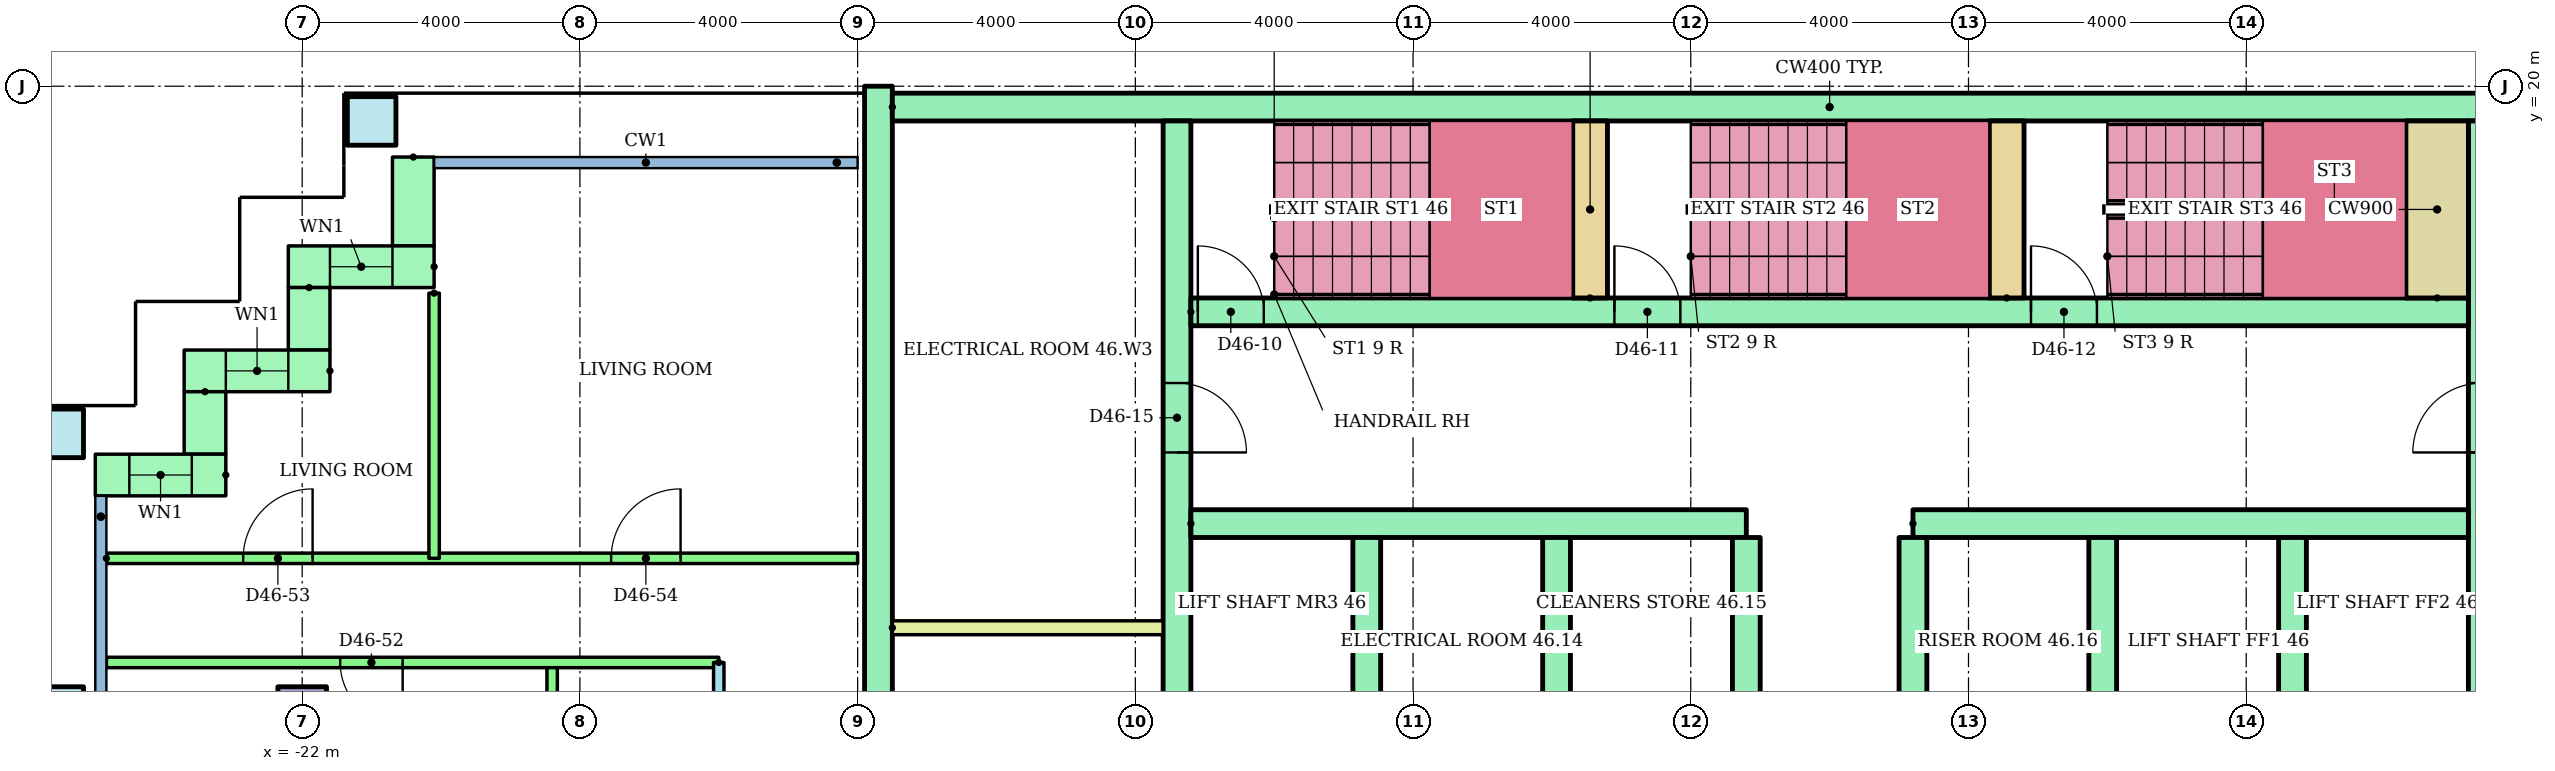
"""IFC4 building model, lengths in metres.
Left out: names, types, materials, properties, quantities, classifications, styles, units other than length and angle.
Written with IfcOpenShell. Run it as: python <this file> out.ifc"""

import sys

from ifc_helpers import new_model, si_unit, direction, frame, frame_2d, origin, origin_2d, place, context, subcontext, project, spatial, rectangle, hollow_rectangle, extrude, element, fill, save


model = new_model("IFC4")
c1 = context("Model", 3, precision=1e-05, world=origin(), true_north=direction((0.0, 1.0)))
c2 = subcontext(c1, "Body", "Model", "MODEL_VIEW")
j1 = project(units=[si_unit("LENGTHUNIT", "METRE"), si_unit("PLANEANGLEUNIT", "RADIAN")], contexts=[c1])
p1 = place(None, origin())
s1 = spatial("IfcSite", under=j1, at=p1, CompositionType="ELEMENT")
p2 = place(p1, origin())
s2 = spatial("IfcBuilding", under=s1, at=p2, CompositionType="ELEMENT")
p3 = place(p2, frame((0.0, 0.0, 178.1)))
s3 = spatial("IfcBuildingStorey", under=s2, at=p3, CompositionType="ELEMENT", Elevation=178.1)
p4 = place(p3, frame((-25.5, 11.0, 0.0)))
e1 = element("IfcColumn", 1, at=p4, inside=s3, PredefinedType="COLUMN", context=c2, shape_type="SweptSolid", body=[
    extrude(hollow_rectangle(XDim=0.7, YDim=0.7, WallThickness=0.036, at=origin_2d()), origin(), (0.0, 0.0, 1.0), 3.2),
])
p5 = place(p3, frame((-22.0, 11.0, 0.0)))
e2 = element("IfcColumn", 2, at=p5, inside=s3, PredefinedType="COLUMN", context=c2, shape_type="SweptSolid", body=[
    extrude(rectangle(XDim=0.7, YDim=0.7, at=origin_2d()), origin(), (0.0, 0.0, 1.0), 3.2),
])
for number, where in (
    (3, (-25.5, 15.0, 0.0)),
    (4, (-21.0, 19.5, 0.0)),
):
    element("IfcColumn", number, at=place(p3, frame(where)), inside=s3, PredefinedType="COLUMN", context=c2, shape_type="SweptSolid", body=[
        extrude(hollow_rectangle(XDim=0.7, YDim=0.7, WallThickness=0.036, at=origin_2d()), origin(), (0.0, 0.0, 1.0), 3.2),
    ])
p6 = place(p3, frame((-20.4, 18.98, 0.0), z_axis=(0.0, 0.0, 1.0), x_axis=(0.0, -1.0, 0.0)))
e5 = element("IfcWall", 5, at=p6, inside=s3, PredefinedType="STANDARD", context=c2, shape_type="SweptSolid", body=[
    extrude(rectangle(XDim=1.28, YDim=0.6, at=frame_2d((0.64, 0.0))), origin(), (0.0, 0.0, 1.0), 2.92),
])
p7 = place(p3, frame((-20.1, 17.4, 0.0), z_axis=(0.0, 0.0, 1.0), x_axis=(-1.0, 0.0, 0.0)))
e6 = element("IfcWall", 6, at=p7, inside=s3, PredefinedType="STANDARD", context=c2, shape_type="SweptSolid", body=[
    extrude(rectangle(XDim=2.1, YDim=0.6, at=frame_2d((1.05, 0.0))), origin(), (0.0, 0.0, 1.0), 2.92),
])
p8 = place(p7, frame((0.6, 0.0, 0.9)))
e7 = element("IfcOpeningElement", 7, at=p8, cuts=e6, PredefinedType="OPENING", context=c2, shape_type="SweptSolid", body=[
    extrude(rectangle(XDim=0.9, YDim=1.5, at=frame_2d((0.45, 0.75))), frame((0.0, 0.31, 0.0), z_axis=(0.0, -1.0, 0.0), x_axis=(1.0, 0.0, 0.0)), (0.0, 0.0, 1.0), 0.62),
])
p9 = place(p3, frame((-21.9, 17.1, 0.0), z_axis=(0.0, 0.0, 1.0), x_axis=(0.0, -1.0, 0.0)))
e8 = element("IfcWall", 8, at=p9, inside=s3, PredefinedType="STANDARD", context=c2, shape_type="SweptSolid", body=[
    extrude(rectangle(XDim=0.9, YDim=0.6, at=frame_2d((0.45, 0.0))), origin(), (0.0, 0.0, 1.0), 2.92),
])
p10 = place(p3, frame((-21.6, 15.9, 0.0), z_axis=(0.0, 0.0, 1.0), x_axis=(-1.0, 0.0, 0.0)))
e9 = element("IfcWall", 9, at=p10, inside=s3, PredefinedType="STANDARD", context=c2, shape_type="SweptSolid", body=[
    extrude(rectangle(XDim=2.1, YDim=0.6, at=frame_2d((1.05, 0.0))), origin(), (0.0, 0.0, 1.0), 2.92),
])
p11 = place(p10, frame((0.6, 0.0, 0.9)))
e10 = element("IfcOpeningElement", 10, at=p11, cuts=e9, PredefinedType="OPENING", context=c2, shape_type="SweptSolid", body=[
    extrude(rectangle(XDim=0.9, YDim=1.5, at=frame_2d((0.45, 0.75))), frame((0.0, 0.31, 0.0), z_axis=(0.0, -1.0, 0.0), x_axis=(1.0, 0.0, 0.0)), (0.0, 0.0, 1.0), 0.62),
])
p12 = place(p3, frame((-23.4, 15.6, 0.0), z_axis=(0.0, 0.0, 1.0), x_axis=(0.0, -1.0, 0.0)))
e11 = element("IfcWall", 11, at=p12, inside=s3, PredefinedType="STANDARD", context=c2, shape_type="SweptSolid", body=[
    extrude(rectangle(XDim=0.9, YDim=0.6, at=frame_2d((0.45, 0.0))), origin(), (0.0, 0.0, 1.0), 2.92),
])
p13 = place(p3, frame((-23.1, 14.4, 0.0), z_axis=(0.0, 0.0, 1.0), x_axis=(-1.0, 0.0, 0.0)))
e12 = element("IfcWall", 12, at=p13, inside=s3, PredefinedType="STANDARD", context=c2, shape_type="SweptSolid", body=[
    extrude(rectangle(XDim=1.88, YDim=0.6, at=frame_2d((0.94, 0.0))), origin(), (0.0, 0.0, 1.0), 2.92),
])
p14 = place(p13, frame((0.49, 0.0, 0.9)))
e13 = element("IfcOpeningElement", 13, at=p14, cuts=e12, PredefinedType="OPENING", context=c2, shape_type="SweptSolid", body=[
    extrude(rectangle(XDim=0.9, YDim=1.5, at=frame_2d((0.45, 0.75))), frame((0.0, 0.31, 0.0), z_axis=(0.0, -1.0, 0.0), x_axis=(1.0, 0.0, 0.0)), (0.0, 0.0, 1.0), 0.62),
])
p15 = place(p3, frame((-13.7, 3.0, 0.0), z_axis=(0.0, 0.0, 1.0), x_axis=(0.0, 1.0, 0.0)))
e14 = element("IfcWall", 14, at=p15, inside=s3, PredefinedType="SHEAR", context=c2, shape_type="SweptSolid", body=[
    extrude(rectangle(XDim=17.0, YDim=0.4, at=frame_2d((8.5, 0.0))), origin(), (0.0, 0.0, 1.0), 2.92),
])
p16 = place(p3, frame((-13.5, 19.7, 0.0)))
e15 = element("IfcWall", 15, at=p16, inside=s3, PredefinedType="SHEAR", context=c2, shape_type="SweptSolid", body=[
    extrude(rectangle(XDim=27.0, YDim=0.4, at=frame_2d((13.5, 0.0))), origin(), (0.0, 0.0, 1.0), 2.92),
])
p17 = place(p3, frame((-9.4, 6.8, 0.0), z_axis=(0.0, 0.0, 1.0), x_axis=(0.0, 1.0, 0.0)))
e16 = element("IfcWall", 16, at=p17, inside=s3, PredefinedType="SHEAR", context=c2, shape_type="SweptSolid", body=[
    extrude(rectangle(XDim=12.7, YDim=0.4, at=frame_2d((6.35, 0.0))), origin(), (0.0, 0.0, 1.0), 2.92),
])
p18 = place(p17, frame((0.3, 0.0, 0.0)))
e17 = element("IfcOpeningElement", 17, at=p18, cuts=e16, PredefinedType="OPENING", context=c2, shape_type="SweptSolid", body=[
    extrude(rectangle(XDim=1.0, YDim=2.1, at=frame_2d((0.5, 1.05))), frame((0.0, 0.21, 0.0), z_axis=(0.0, -1.0, 0.0), x_axis=(1.0, 0.0, 0.0)), (0.0, 0.0, 1.0), 0.42),
])
p19 = place(p17, frame((2.05, 0.0, 0.0)))
e18 = element("IfcOpeningElement", 18, at=p19, cuts=e16, PredefinedType="OPENING", context=c2, shape_type="SweptSolid", body=[
    extrude(rectangle(XDim=1.0, YDim=2.1, at=frame_2d((0.5, 1.05))), frame((0.0, 0.21, 0.0), z_axis=(0.0, -1.0, 0.0), x_axis=(1.0, 0.0, 0.0)), (0.0, 0.0, 1.0), 0.42),
])
p20 = place(p17, frame((7.925, 0.0, 0.0)))
e19 = element("IfcOpeningElement", 19, at=p20, cuts=e16, PredefinedType="OPENING", context=c2, shape_type="SweptSolid", body=[
    extrude(rectangle(XDim=1.0, YDim=2.1, at=frame_2d((0.5, 1.05))), frame((0.0, 0.21, 0.0), z_axis=(0.0, -1.0, 0.0), x_axis=(1.0, 0.0, 0.0)), (0.0, 0.0, 1.0), 0.42),
])
p21 = place(p3, frame((9.4, 6.8, 0.0), z_axis=(0.0, 0.0, 1.0), x_axis=(0.0, 1.0, 0.0)))
e20 = element("IfcWall", 20, at=p21, inside=s3, PredefinedType="SHEAR", context=c2, shape_type="SweptSolid", body=[
    extrude(rectangle(XDim=12.7, YDim=0.4, at=frame_2d((6.35, 0.0))), origin(), (0.0, 0.0, 1.0), 2.92),
])
p22 = place(p21, frame((1.15, 0.0, 0.0)))
e21 = element("IfcOpeningElement", 21, at=p22, cuts=e20, PredefinedType="OPENING", context=c2, shape_type="SweptSolid", body=[
    extrude(rectangle(XDim=1.0, YDim=2.1, at=frame_2d((0.5, 1.05))), frame((0.0, 0.21, 0.0), z_axis=(0.0, -1.0, 0.0), x_axis=(1.0, 0.0, 0.0)), (0.0, 0.0, 1.0), 0.42),
])
p23 = place(p21, frame((7.925, 0.0, 0.0)))
e22 = element("IfcOpeningElement", 22, at=p23, cuts=e20, PredefinedType="OPENING", context=c2, shape_type="SweptSolid", body=[
    extrude(rectangle(XDim=1.0, YDim=2.1, at=frame_2d((0.5, 1.05))), frame((0.0, 0.21, 0.0), z_axis=(0.0, -1.0, 0.0), x_axis=(1.0, 0.0, 0.0)), (0.0, 0.0, 1.0), 0.42),
])
for number, where in (
    (23, (-9.2, 13.7, 0.0)),
    (24, (1.2, 13.7, 0.0)),
):
    element("IfcWall", number, at=place(p3, frame(where)), inside=s3, PredefinedType="SHEAR", context=c2, shape_type="SweptSolid", body=[
        extrude(rectangle(XDim=8.0, YDim=0.4, at=frame_2d((4.0, 0.0))), origin(), (0.0, 0.0, 1.0), 2.92),
    ])
for number, where, z_axis, x_axis in (
    (25, (-6.667, 10.5, 0.0), (0.0, 0.0, 1.0), (0.0, 1.0, 0.0)),
    (26, (-3.933, 10.5, 0.0), (0.0, 0.0, 1.0), (0.0, 1.0, 0.0)),
    (27, (-1.2, 10.5, 0.0), (0.0, 0.0, 1.0), (0.0, 1.0, 0.0)),
    (28, (1.2, 10.5, 0.0), (0.0, 0.0, 1.0), (0.0, 1.0, 0.0)),
    (29, (3.933, 10.5, 0.0), (0.0, 0.0, 1.0), (0.0, 1.0, 0.0)),
    (30, (6.667, 10.5, 0.0), (0.0, 0.0, 1.0), (0.0, 1.0, 0.0)),
):
    element("IfcWall", number, at=place(p3, frame(where, z_axis=z_axis, x_axis=x_axis)), inside=s3, PredefinedType="SHEAR", context=c2, shape_type="SweptSolid", body=[
        extrude(rectangle(XDim=3.0, YDim=0.4, at=frame_2d((1.5, 0.0))), origin(), (0.0, 0.0, 1.0), 2.92),
    ])
p24 = place(p3, frame((-9.2, 16.75, 0.0)))
e31 = element("IfcWall", 31, at=p24, inside=s3, PredefinedType="SHEAR", context=c2, shape_type="SweptSolid", body=[
    extrude(rectangle(XDim=18.4, YDim=0.4, at=frame_2d((9.2, 0.0))), origin(), (0.0, 0.0, 1.0), 2.92),
])
p25 = place(p24, frame((0.1, 0.0, 0.0)))
e32 = element("IfcOpeningElement", 32, at=p25, cuts=e31, PredefinedType="OPENING", context=c2, shape_type="SweptSolid", body=[
    extrude(rectangle(XDim=0.95, YDim=2.1, at=frame_2d((0.475, 1.05))), frame((0.0, 0.21, 0.0), z_axis=(0.0, -1.0, 0.0), x_axis=(1.0, 0.0, 0.0)), (0.0, 0.0, 1.0), 0.42),
])
p26 = place(p24, frame((6.1, 0.0, 0.0)))
e33 = element("IfcOpeningElement", 33, at=p26, cuts=e31, PredefinedType="OPENING", context=c2, shape_type="SweptSolid", body=[
    extrude(rectangle(XDim=0.95, YDim=2.1, at=frame_2d((0.475, 1.05))), frame((0.0, 0.21, 0.0), z_axis=(0.0, -1.0, 0.0), x_axis=(1.0, 0.0, 0.0)), (0.0, 0.0, 1.0), 0.42),
])
p27 = place(p24, frame((12.1, 0.0, 0.0)))
e34 = element("IfcOpeningElement", 34, at=p27, cuts=e31, PredefinedType="OPENING", context=c2, shape_type="SweptSolid", body=[
    extrude(rectangle(XDim=0.95, YDim=2.1, at=frame_2d((0.475, 1.05))), frame((0.0, 0.21, 0.0), z_axis=(0.0, -1.0, 0.0), x_axis=(1.0, 0.0, 0.0)), (0.0, 0.0, 1.0), 0.42),
])
for number, where, z_axis, x_axis in (
    (35, (-3.45, 16.95, 0.0), (0.0, 0.0, 1.0), (0.0, 1.0, 0.0)),
    (36, (2.55, 16.95, 0.0), (0.0, 0.0, 1.0), (0.0, 1.0, 0.0)),
):
    element("IfcWall", number, at=place(p3, frame(where, z_axis=z_axis, x_axis=x_axis)), inside=s3, PredefinedType="SHEAR", context=c2, shape_type="SweptSolid", body=[
        extrude(rectangle(XDim=2.55, YDim=0.5, at=frame_2d((1.275, 0.0))), origin(), (0.0, 0.0, 1.0), 2.92),
    ])
p28 = place(p3, frame((8.75, 16.95, 0.0), z_axis=(0.0, 0.0, 1.0), x_axis=(0.0, 1.0, 0.0)))
e37 = element("IfcWall", 37, at=p28, inside=s3, PredefinedType="SHEAR", context=c2, shape_type="SweptSolid", body=[
    extrude(rectangle(XDim=2.55, YDim=0.9, at=frame_2d((1.275, 0.0))), origin(), (0.0, 0.0, 1.0), 2.92),
])
p29 = place(p3, frame((-13.5, 12.2, 0.0)))
e38 = element("IfcWall", 38, at=p29, inside=s3, PredefinedType="PARTITIONING", context=c2, shape_type="SweptSolid", body=[
    extrude(rectangle(XDim=3.9, YDim=0.2, at=frame_2d((1.95, 0.0))), origin(), (0.0, 0.0, 1.0), 2.92),
])
p30 = place(p3, frame((-16.0, 1.4, 0.0), z_axis=(0.0, 0.0, 1.0), x_axis=(0.0, 1.0, 0.0)))
e39 = element("IfcWall", 39, at=p30, inside=s3, PredefinedType="PARTITIONING", context=c2, shape_type="SweptSolid", body=[
    extrude(rectangle(XDim=10.3, YDim=0.15, at=frame_2d((5.15, 0.0))), origin(), (0.0, 0.0, 1.0), 2.4),
])
p31 = place(p30, frame((2.425, 0.0, 0.0)))
e40 = element("IfcOpeningElement", 40, at=p31, cuts=e39, PredefinedType="OPENING", context=c2, shape_type="SweptSolid", body=[
    extrude(rectangle(XDim=0.9, YDim=2.1, at=frame_2d((0.45, 1.05))), frame((0.0, 0.085, 0.0), z_axis=(0.0, -1.0, 0.0), x_axis=(1.0, 0.0, 0.0)), (0.0, 0.0, 1.0), 0.17),
])
p32 = place(p30, frame((7.625, 0.0, 0.0)))
e41 = element("IfcOpeningElement", 41, at=p32, cuts=e39, PredefinedType="OPENING", context=c2, shape_type="SweptSolid", body=[
    extrude(rectangle(XDim=0.8, YDim=2.1, at=frame_2d((0.4, 1.05))), frame((0.0, 0.085, 0.0), z_axis=(0.0, -1.0, 0.0), x_axis=(1.0, 0.0, 0.0)), (0.0, 0.0, 1.0), 0.17),
])
p33 = place(p3, frame((-18.4, 1.4, 0.0), z_axis=(0.0, 0.0, 1.0), x_axis=(0.0, 1.0, 0.0)))
e42 = element("IfcWall", 42, at=p33, inside=s3, PredefinedType="PARTITIONING", context=c2, shape_type="SweptSolid", body=[
    extrude(rectangle(XDim=10.3, YDim=0.15, at=frame_2d((5.15, 0.0))), origin(), (0.0, 0.0, 1.0), 2.4),
])
p34 = place(p3, frame((-16.0, 11.7, 0.0), z_axis=(0.0, 0.0, 1.0), x_axis=(-1.0, 0.0, 0.0)))
e43 = element("IfcWall", 43, at=p34, inside=s3, PredefinedType="PARTITIONING", context=c2, shape_type="SweptSolid", body=[
    extrude(rectangle(XDim=8.82, YDim=0.15, at=frame_2d((4.41, 0.0))), origin(), (0.0, 0.0, 1.0), 2.4),
])
p35 = place(p34, frame((4.553, 0.0, 0.0)))
e44 = element("IfcOpeningElement", 44, at=p35, cuts=e43, PredefinedType="OPENING", context=c2, shape_type="SweptSolid", body=[
    extrude(rectangle(XDim=0.9, YDim=2.1, at=frame_2d((0.45, 1.05))), frame((0.0, 0.085, 0.0), z_axis=(0.0, -1.0, 0.0), x_axis=(1.0, 0.0, 0.0)), (0.0, 0.0, 1.0), 0.17),
])
p36 = place(p3, frame((-24.82, 13.2, 0.0)))
e45 = element("IfcWall", 45, at=p36, inside=s3, PredefinedType="PARTITIONING", context=c2, shape_type="SweptSolid", body=[
    extrude(rectangle(XDim=10.82, YDim=0.15, at=frame_2d((5.41, 0.0))), origin(), (0.0, 0.0, 1.0), 2.4),
])
p37 = place(p36, frame((1.97, 0.0, 0.0)))
e46 = element("IfcOpeningElement", 46, at=p37, cuts=e45, PredefinedType="OPENING", context=c2, shape_type="SweptSolid", body=[
    extrude(rectangle(XDim=1.0, YDim=2.1, at=frame_2d((0.5, 1.05))), frame((0.0, 0.085, 0.0), z_axis=(0.0, -1.0, 0.0), x_axis=(1.0, 0.0, 0.0)), (0.0, 0.0, 1.0), 0.17),
])
p38 = place(p36, frame((7.27, 0.0, 0.0)))
e47 = element("IfcOpeningElement", 47, at=p38, cuts=e45, PredefinedType="OPENING", context=c2, shape_type="SweptSolid", body=[
    extrude(rectangle(XDim=1.0, YDim=2.1, at=frame_2d((0.5, 1.05))), frame((0.0, 0.085, 0.0), z_axis=(0.0, -1.0, 0.0), x_axis=(1.0, 0.0, 0.0)), (0.0, 0.0, 1.0), 0.17),
])
p39 = place(p3, frame((-20.1, 17.02, 0.0), z_axis=(0.0, 0.0, 1.0), x_axis=(0.0, -1.0, 0.0)))
e48 = element("IfcWall", 48, at=p39, inside=s3, PredefinedType="PARTITIONING", context=c2, shape_type="SweptSolid", body=[
    extrude(rectangle(XDim=3.82, YDim=0.15, at=frame_2d((1.91, 0.0))), origin(), (0.0, 0.0, 1.0), 2.4),
])
p40 = place(p8, origin())
e49 = element("IfcWindow", 49, at=p40, inside=s3, PartitioningType="SINGLE_PANEL", PredefinedType="WINDOW", context=c2, shape_type="SweptSolid", body=[
    extrude(rectangle(XDim=0.9, YDim=1.5, at=frame_2d((0.45, 0.75))), frame((0.0, 0.03, 0.0), z_axis=(0.0, -1.0, 0.0), x_axis=(1.0, 0.0, 0.0)), (0.0, 0.0, 1.0), 0.06),
])
fill(e7, e49)
p41 = place(p11, origin())
e50 = element("IfcWindow", 50, at=p41, inside=s3, PartitioningType="SINGLE_PANEL", PredefinedType="WINDOW", context=c2, shape_type="SweptSolid", body=[
    extrude(rectangle(XDim=0.9, YDim=1.5, at=frame_2d((0.45, 0.75))), frame((0.0, 0.03, 0.0), z_axis=(0.0, -1.0, 0.0), x_axis=(1.0, 0.0, 0.0)), (0.0, 0.0, 1.0), 0.06),
])
fill(e10, e50)
p42 = place(p14, origin())
e51 = element("IfcWindow", 51, at=p42, inside=s3, PartitioningType="SINGLE_PANEL", PredefinedType="WINDOW", context=c2, shape_type="SweptSolid", body=[
    extrude(rectangle(XDim=0.9, YDim=1.5, at=frame_2d((0.45, 0.75))), frame((0.0, 0.03, 0.0), z_axis=(0.0, -1.0, 0.0), x_axis=(1.0, 0.0, 0.0)), (0.0, 0.0, 1.0), 0.06),
])
fill(e13, e51)
p43 = place(p25, origin())
e52 = element("IfcDoor", 52, at=p43, inside=s3, OperationType="SINGLE_SWING_LEFT", PredefinedType="DOOR", context=c2, shape_type="SweptSolid", body=[
    extrude(rectangle(XDim=0.95, YDim=2.1, at=frame_2d((0.475, 1.05))), frame((0.0, 0.025, 0.0), z_axis=(0.0, -1.0, 0.0), x_axis=(1.0, 0.0, 0.0)), (0.0, 0.0, 1.0), 0.05),
])
fill(e32, e52)
p44 = place(p26, origin())
e53 = element("IfcDoor", 53, at=p44, inside=s3, OperationType="SINGLE_SWING_LEFT", PredefinedType="DOOR", context=c2, shape_type="SweptSolid", body=[
    extrude(rectangle(XDim=0.95, YDim=2.1, at=frame_2d((0.475, 1.05))), frame((0.0, 0.025, 0.0), z_axis=(0.0, -1.0, 0.0), x_axis=(1.0, 0.0, 0.0)), (0.0, 0.0, 1.0), 0.05),
])
fill(e33, e53)
p45 = place(p27, origin())
e54 = element("IfcDoor", 54, at=p45, inside=s3, OperationType="SINGLE_SWING_LEFT", PredefinedType="DOOR", context=c2, shape_type="SweptSolid", body=[
    extrude(rectangle(XDim=0.95, YDim=2.1, at=frame_2d((0.475, 1.05))), frame((0.0, 0.025, 0.0), z_axis=(0.0, -1.0, 0.0), x_axis=(1.0, 0.0, 0.0)), (0.0, 0.0, 1.0), 0.05),
])
fill(e34, e54)
p46 = place(p20, frame((1.0, 0.0, 0.0), z_axis=(0.0, 0.0, 1.0), x_axis=(-1.0, 0.0, 0.0)))
e55 = element("IfcDoor", 55, at=p46, inside=s3, OperationType="SINGLE_SWING_LEFT", PredefinedType="DOOR", context=c2, shape_type="SweptSolid", body=[
    extrude(rectangle(XDim=1.0, YDim=2.1, at=frame_2d((0.5, 1.05))), frame((0.0, 0.025, 0.0), z_axis=(0.0, -1.0, 0.0), x_axis=(1.0, 0.0, 0.0)), (0.0, 0.0, 1.0), 0.05),
])
fill(e19, e55)
p47 = place(p35, origin())
e56 = element("IfcDoor", 56, at=p47, inside=s3, OperationType="SINGLE_SWING_LEFT", PredefinedType="DOOR", context=c2, shape_type="SweptSolid", body=[
    extrude(rectangle(XDim=0.9, YDim=2.1, at=frame_2d((0.45, 1.05))), frame((0.0, 0.025, 0.0), z_axis=(0.0, -1.0, 0.0), x_axis=(1.0, 0.0, 0.0)), (0.0, 0.0, 1.0), 0.05),
])
fill(e44, e56)
p48 = place(p37, origin())
e57 = element("IfcDoor", 57, at=p48, inside=s3, OperationType="SINGLE_SWING_RIGHT", PredefinedType="DOOR", context=c2, shape_type="SweptSolid", body=[
    extrude(rectangle(XDim=1.0, YDim=2.1, at=frame_2d((0.5, 1.05))), frame((0.0, 0.025, 0.0), z_axis=(0.0, -1.0, 0.0), x_axis=(1.0, 0.0, 0.0)), (0.0, 0.0, 1.0), 0.05),
])
fill(e46, e57)
p49 = place(p38, origin())
e58 = element("IfcDoor", 58, at=p49, inside=s3, OperationType="SINGLE_SWING_RIGHT", PredefinedType="DOOR", context=c2, shape_type="SweptSolid", body=[
    extrude(rectangle(XDim=1.0, YDim=2.1, at=frame_2d((0.5, 1.05))), frame((0.0, 0.025, 0.0), z_axis=(0.0, -1.0, 0.0), x_axis=(1.0, 0.0, 0.0)), (0.0, 0.0, 1.0), 0.05),
])
fill(e47, e58)
save(model, sys.argv[1])
